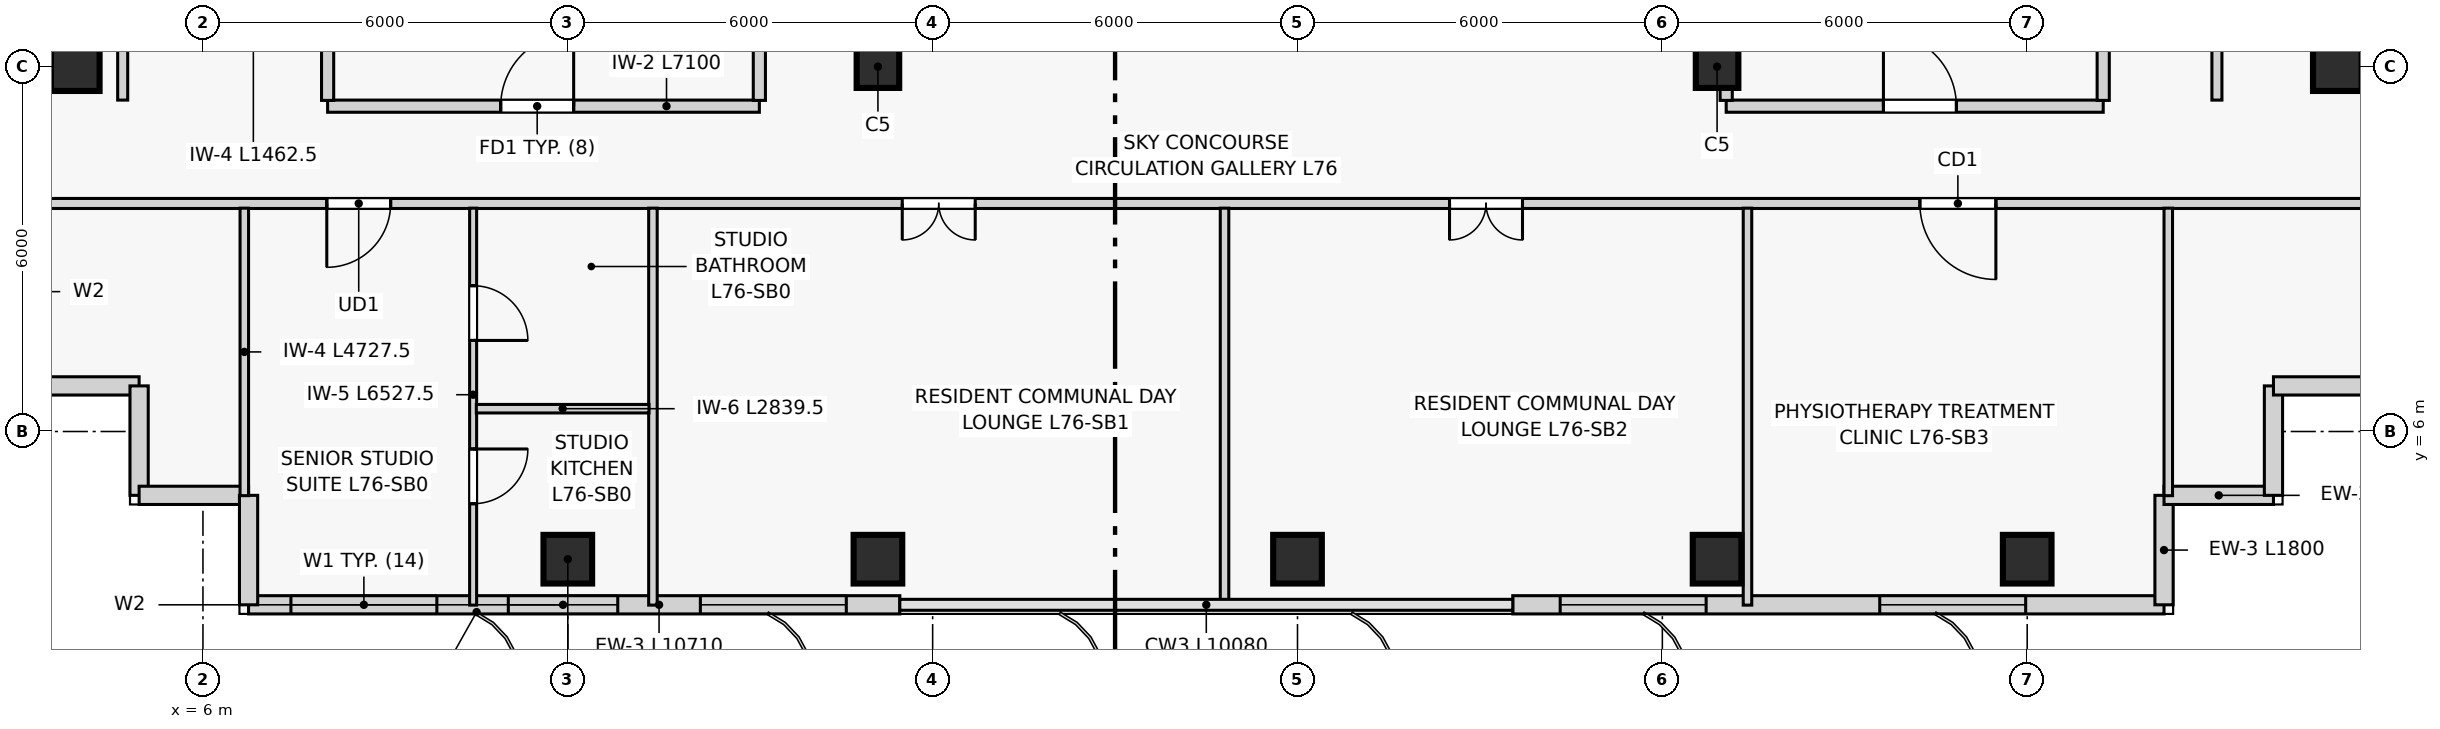
"""IFC4 building model, lengths in metres.
Left out: names, types, materials, properties, quantities, classifications, styles, units other than length and angle.
Written with IfcOpenShell. Run it as: python <this file> out.ifc"""

import sys

from ifc_helpers import new_model, si_unit, direction, frame, frame_2d, origin, origin_2d, place, context, subcontext, project, spatial, rectangle, extrude, source, transform, mapped, element, fill, save


model = new_model("IFC4")
c1 = context("Model", 3, precision=1e-05, world=origin(), true_north=direction((0.0, 1.0)))
c2 = subcontext(c1, "Body", "Model", "MODEL_VIEW")
j1 = project(units=[si_unit("LENGTHUNIT", "METRE"), si_unit("PLANEANGLEUNIT", "RADIAN")], contexts=[c1])
p1 = place(None, origin())
s1 = spatial("IfcSite", under=j1, at=p1, CompositionType="ELEMENT")
p2 = place(p1, origin())
s2 = spatial("IfcBuilding", under=s1, at=p2, CompositionType="ELEMENT")
p3 = place(p2, frame((0.0, 0.0, 289.5)))
s3 = spatial("IfcBuildingStorey", under=s2, at=p3, CompositionType="ELEMENT", Elevation=289.5)
m1 = source(origin(), c2, "Body", "SweptSolid", [
    extrude(rectangle(XDim=0.8, YDim=0.8, at=origin_2d()), origin(), (0.0, 0.0, 1.0), 4.2),
])
for number, where, z_axis, x_axis in (
    (1, (12.0, 3.9, 0.0), (0.0, 0.0, 1.0), (1.0, 0.0, 0.0)),
    (2, (17.1, 3.9, 0.0), (0.0, 0.0, 1.0), (1.0, 0.0, 0.0)),
    (3, (24.0, 3.9, 0.0), (0.0, 0.0, 1.0), (1.0, 0.0, 0.0)),
    (4, (30.9, 3.9, 0.0), (0.0, 0.0, 1.0), (1.0, 0.0, 0.0)),
    (5, (36.0, 3.9, 0.0), (0.0, 0.0, 1.0), (1.0, 0.0, 0.0)),
    (6, (3.9, 12.0, 0.0), (0.0, 0.0, 1.0), (1.0, 0.0, 0.0)),
    (7, (41.1, 12.0, 0.0), (0.0, 0.0, 1.0), (1.0, 0.0, 0.0)),
):
    element("IfcColumn", number, at=place(p3, frame(where, z_axis=z_axis, x_axis=x_axis)), inside=s3, PredefinedType="COLUMN", context=c2, shape_type="MappedRepresentation", body=[
        mapped(m1, transform((0.0, 0.0, 0.0), scale=1.0)),
    ])
m2 = source(origin(), c2, "Body", "SweptSolid", [
    extrude(rectangle(XDim=0.7, YDim=0.7, at=origin_2d()), origin(), (0.0, 0.0, 1.0), 4.2),
])
for number, where, z_axis, x_axis in (
    (8, (17.1, 12.0, 0.0), (0.0, 0.0, 1.0), (1.0, 0.0, 0.0)),
    (9, (30.9, 12.0, 0.0), (0.0, 0.0, 1.0), (1.0, 0.0, 0.0)),
):
    element("IfcColumn", number, at=place(p3, frame(where, z_axis=z_axis, x_axis=x_axis)), inside=s3, PredefinedType="COLUMN", context=c2, shape_type="MappedRepresentation", body=[
        mapped(m2, transform((0.0, 0.0, 0.0), scale=1.0)),
    ])
p4 = place(p3, frame((6.75, 3.15, 0.0), z_axis=(0.0, 0.0, 1.0), x_axis=(1.0, 0.0, 0.0)))
e10 = element("IfcWall", 10, at=p4, inside=s3, PredefinedType="SOLIDWALL", context=c2, shape_type="SweptSolid", body=[
    extrude(rectangle(XDim=10.71, YDim=0.3, at=frame_2d((5.355, 0.0))), origin(), (0.0, 0.0, 1.0), 3.92),
])
p5 = place(p4, frame((0.697, 0.0, 0.8)))
e11 = element("IfcOpeningElement", 11, at=p5, cuts=e10, PredefinedType="OPENING", context=c2, shape_type="SweptSolid", body=[
    extrude(rectangle(XDim=2.4, YDim=2.1, at=frame_2d((1.2, 1.05))), frame((0.0, 0.16, 0.0), z_axis=(0.0, -1.0, 0.0), x_axis=(1.0, 0.0, 0.0)), (0.0, 0.0, 1.0), 0.32),
])
p6 = place(p4, frame((4.271, 0.0, 0.8)))
e12 = element("IfcOpeningElement", 12, at=p6, cuts=e10, PredefinedType="OPENING", context=c2, shape_type="SweptSolid", body=[
    extrude(rectangle(XDim=1.8, YDim=2.1, at=frame_2d((0.9, 1.05))), frame((0.0, 0.16, 0.0), z_axis=(0.0, -1.0, 0.0), x_axis=(1.0, 0.0, 0.0)), (0.0, 0.0, 1.0), 0.32),
])
p7 = place(p4, frame((7.43, 0.0, 0.8)))
e13 = element("IfcOpeningElement", 13, at=p7, cuts=e10, PredefinedType="OPENING", context=c2, shape_type="SweptSolid", body=[
    extrude(rectangle(XDim=2.4, YDim=2.1, at=frame_2d((1.2, 1.05))), frame((0.0, 0.16, 0.0), z_axis=(0.0, -1.0, 0.0), x_axis=(1.0, 0.0, 0.0)), (0.0, 0.0, 1.0), 0.32),
])
p8 = place(p3, frame((27.54, 3.15, 0.0), z_axis=(0.0, 0.0, 1.0), x_axis=(1.0, 0.0, 0.0)))
e14 = element("IfcWall", 14, at=p8, inside=s3, PredefinedType="SOLIDWALL", context=c2, shape_type="SweptSolid", body=[
    extrude(rectangle(XDim=10.71, YDim=0.3, at=frame_2d((5.355, 0.0))), origin(), (0.0, 0.0, 1.0), 3.92),
])
p9 = place(p8, frame((0.78, 0.0, 0.8)))
e15 = element("IfcOpeningElement", 15, at=p9, cuts=e14, PredefinedType="OPENING", context=c2, shape_type="SweptSolid", body=[
    extrude(rectangle(XDim=2.4, YDim=2.1, at=frame_2d((1.2, 1.05))), frame((0.0, 0.16, 0.0), z_axis=(0.0, -1.0, 0.0), x_axis=(1.0, 0.0, 0.0)), (0.0, 0.0, 1.0), 0.32),
])
p10 = place(p8, frame((6.035, 0.0, 0.8)))
e16 = element("IfcOpeningElement", 16, at=p10, cuts=e14, PredefinedType="OPENING", context=c2, shape_type="SweptSolid", body=[
    extrude(rectangle(XDim=2.4, YDim=2.1, at=frame_2d((1.2, 1.05))), frame((0.0, 0.16, 0.0), z_axis=(0.0, -1.0, 0.0), x_axis=(1.0, 0.0, 0.0)), (0.0, 0.0, 1.0), 0.32),
])
for number, where, z_axis, x_axis in (
    (17, (38.25, 3.15, 0.0), (0.0, 0.0, 1.0), (0.0, 1.0, 0.0)),
    (18, (38.25, 4.95, 0.0), (0.0, 0.0, 1.0), (1.0, 0.0, 0.0)),
    (19, (40.05, 4.95, 0.0), (0.0, 0.0, 1.0), (0.0, 1.0, 0.0)),
    (20, (40.05, 6.75, 0.0), (0.0, 0.0, 1.0), (1.0, 0.0, 0.0)),
    (21, (3.15, 6.75, 0.0), (0.0, 0.0, 1.0), (1.0, 0.0, 0.0)),
    (22, (4.95, 6.75, 0.0), (0.0, 0.0, 1.0), (0.0, -1.0, 0.0)),
    (23, (4.95, 4.95, 0.0), (0.0, 0.0, 1.0), (1.0, 0.0, 0.0)),
    (24, (6.75, 4.95, 0.0), (0.0, 0.0, 1.0), (0.0, -1.0, 0.0)),
):
    element("IfcWall", number, at=place(p3, frame(where, z_axis=z_axis, x_axis=x_axis)), inside=s3, PredefinedType="SOLIDWALL", context=c2, shape_type="SweptSolid", body=[
        extrude(rectangle(XDim=1.8, YDim=0.3, at=frame_2d((0.9, 0.0))), origin(), (0.0, 0.0, 1.0), 3.92),
    ])
p11 = place(p3, frame((8.05, 11.35, 0.0), z_axis=(0.0, 0.0, 1.0), x_axis=(1.0, 0.0, 0.0)))
e25 = element("IfcWall", 25, at=p11, inside=s3, PredefinedType="PARTITIONING", context=c2, shape_type="SweptSolid", body=[
    extrude(rectangle(XDim=7.1, YDim=0.2, at=frame_2d((3.55, 0.0))), origin(), (0.0, 0.0, 1.0), 3.92),
])
p12 = place(p11, frame((2.846, 0.0, 0.0)))
e26 = element("IfcOpeningElement", 26, at=p12, cuts=e25, PredefinedType="OPENING", context=c2, shape_type="SweptSolid", body=[
    extrude(rectangle(XDim=1.2, YDim=2.2, at=frame_2d((0.6, 1.1))), frame((0.0, 0.11, 0.0), z_axis=(0.0, -1.0, 0.0), x_axis=(1.0, 0.0, 0.0)), (0.0, 0.0, 1.0), 0.22),
])
for number, where, z_axis, x_axis in (
    (27, (8.05, 11.445, 0.0), (0.0, 0.0, 1.0), (0.0, 1.0, 0.0)),
    (28, (15.15, 11.445, 0.0), (0.0, 0.0, 1.0), (0.0, 1.0, 0.0)),
):
    element("IfcWall", number, at=place(p3, frame(where, z_axis=z_axis, x_axis=x_axis)), inside=s3, PredefinedType="PARTITIONING", context=c2, shape_type="SweptSolid", body=[
        extrude(rectangle(XDim=3.335, YDim=0.2, at=frame_2d((1.667, 0.0))), origin(), (0.0, 0.0, 1.0), 3.92),
    ])
p13 = place(p3, frame((31.05, 11.35, 0.0), z_axis=(0.0, 0.0, 1.0), x_axis=(1.0, 0.0, 0.0)))
e29 = element("IfcWall", 29, at=p13, inside=s3, PredefinedType="PARTITIONING", context=c2, shape_type="SweptSolid", body=[
    extrude(rectangle(XDim=6.2, YDim=0.2, at=frame_2d((3.1, 0.0))), origin(), (0.0, 0.0, 1.0), 3.92),
])
p14 = place(p13, frame((2.586, 0.0, 0.0)))
e30 = element("IfcOpeningElement", 30, at=p14, cuts=e29, PredefinedType="OPENING", context=c2, shape_type="SweptSolid", body=[
    extrude(rectangle(XDim=1.2, YDim=2.2, at=frame_2d((0.6, 1.1))), frame((0.0, 0.11, 0.0), z_axis=(0.0, -1.0, 0.0), x_axis=(1.0, 0.0, 0.0)), (0.0, 0.0, 1.0), 0.22),
])
p15 = place(p3, frame((31.05, 11.445, 0.0), z_axis=(0.0, 0.0, 1.0), x_axis=(0.0, 1.0, 0.0)))
e31 = element("IfcWall", 31, at=p15, inside=s3, PredefinedType="PARTITIONING", context=c2, shape_type="SweptSolid", body=[
    extrude(rectangle(XDim=3.335, YDim=0.2, at=frame_2d((1.667, 0.0))), origin(), (0.0, 0.0, 1.0), 3.07),
])
p16 = place(p3, frame((37.25, 11.445, 0.0), z_axis=(0.0, 0.0, 1.0), x_axis=(0.0, 1.0, 0.0)))
e32 = element("IfcWall", 32, at=p16, inside=s3, PredefinedType="PARTITIONING", context=c2, shape_type="SweptSolid", body=[
    extrude(rectangle(XDim=3.335, YDim=0.2, at=frame_2d((1.667, 0.0))), origin(), (0.0, 0.0, 1.0), 3.92),
])
p17 = place(p3, frame((3.145, 9.75, 0.0), z_axis=(0.0, 0.0, 1.0), x_axis=(1.0, 0.0, 0.0)))
e33 = element("IfcWall", 33, at=p17, inside=s3, PredefinedType="PARTITIONING", context=c2, shape_type="SweptSolid", body=[
    extrude(rectangle(XDim=38.71, YDim=0.165, at=frame_2d((19.355, 0.0))), origin(), (0.0, 0.0, 1.0), 3.92),
])
p18 = place(p17, frame((4.892, 0.0, 0.0)))
e34 = element("IfcOpeningElement", 34, at=p18, cuts=e33, PredefinedType="OPENING", context=c2, shape_type="SweptSolid", body=[
    extrude(rectangle(XDim=1.05, YDim=2.15, at=frame_2d((0.525, 1.075))), frame((0.0, 0.093, 0.0), z_axis=(0.0, -1.0, 0.0), x_axis=(1.0, 0.0, 0.0)), (0.0, 0.0, 1.0), 0.185),
])
p19 = place(p17, frame((14.355, 0.0, 0.0)))
e35 = element("IfcOpeningElement", 35, at=p19, cuts=e33, PredefinedType="OPENING", context=c2, shape_type="SweptSolid", body=[
    extrude(rectangle(XDim=1.2, YDim=2.2, at=frame_2d((0.6, 1.1))), frame((0.0, 0.093, 0.0), z_axis=(0.0, -1.0, 0.0), x_axis=(1.0, 0.0, 0.0)), (0.0, 0.0, 1.0), 0.185),
])
p20 = place(p17, frame((23.355, 0.0, 0.0)))
e36 = element("IfcOpeningElement", 36, at=p20, cuts=e33, PredefinedType="OPENING", context=c2, shape_type="SweptSolid", body=[
    extrude(rectangle(XDim=1.2, YDim=2.2, at=frame_2d((0.6, 1.1))), frame((0.0, 0.093, 0.0), z_axis=(0.0, -1.0, 0.0), x_axis=(1.0, 0.0, 0.0)), (0.0, 0.0, 1.0), 0.185),
])
p21 = place(p17, frame((31.09, 0.0, 0.0)))
e37 = element("IfcOpeningElement", 37, at=p21, cuts=e33, PredefinedType="OPENING", context=c2, shape_type="SweptSolid", body=[
    extrude(rectangle(XDim=1.25, YDim=2.2, at=frame_2d((0.625, 1.1))), frame((0.0, 0.093, 0.0), z_axis=(0.0, -1.0, 0.0), x_axis=(1.0, 0.0, 0.0)), (0.0, 0.0, 1.0), 0.185),
])
p22 = place(p3, frame((4.68, 11.45, 0.0), z_axis=(0.0, 0.0, 1.0), x_axis=(0.0, 1.0, 0.0)))
e38 = element("IfcWall", 38, at=p22, inside=s3, PredefinedType="PARTITIONING", context=c2, shape_type="SweptSolid", body=[
    extrude(rectangle(XDim=3.7, YDim=0.165, at=frame_2d((1.85, 0.0))), origin(), (0.0, 0.0, 1.0), 3.92),
])
p23 = place(p22, frame((1.475, 0.0, 0.0)))
e39 = element("IfcOpeningElement", 39, at=p23, cuts=e38, PredefinedType="OPENING", context=c2, shape_type="SweptSolid", body=[
    extrude(rectangle(XDim=0.95, YDim=2.1, at=frame_2d((0.475, 1.05))), frame((0.0, 0.093, 0.0), z_axis=(0.0, -1.0, 0.0), x_axis=(1.0, 0.0, 0.0)), (0.0, 0.0, 1.0), 0.185),
])
p24 = place(p3, frame((39.12, 11.45, 0.0), z_axis=(0.0, 0.0, 1.0), x_axis=(0.0, 1.0, 0.0)))
e40 = element("IfcWall", 40, at=p24, inside=s3, PredefinedType="PARTITIONING", context=c2, shape_type="SweptSolid", body=[
    extrude(rectangle(XDim=18.9, YDim=0.165, at=frame_2d((9.45, 0.0))), origin(), (0.0, 0.0, 1.0), 3.92),
])
p25 = place(p24, frame((2.05, 0.0, 0.0)))
e41 = element("IfcOpeningElement", 41, at=p25, cuts=e40, PredefinedType="OPENING", context=c2, shape_type="SweptSolid", body=[
    extrude(rectangle(XDim=0.95, YDim=2.1, at=frame_2d((0.475, 1.05))), frame((0.0, 0.093, 0.0), z_axis=(0.0, -1.0, 0.0), x_axis=(1.0, 0.0, 0.0)), (0.0, 0.0, 1.0), 0.185),
])
p26 = place(p3, frame((6.68, 4.945, 0.0), z_axis=(0.0, 0.0, 1.0), x_axis=(0.0, 1.0, 0.0)))
e42 = element("IfcWall", 42, at=p26, inside=s3, PredefinedType="PARTITIONING", context=c2, shape_type="SweptSolid", body=[
    extrude(rectangle(XDim=4.728, YDim=0.14, at=frame_2d((2.364, 0.0))), origin(), (0.0, 0.0, 1.0), 3.92),
])
for number, where, z_axis, x_axis in (
    (43, (13.4, 3.145, 0.0), (0.0, 0.0, 1.0), (0.0, 1.0, 0.0)),
    (44, (22.8, 3.145, 0.0), (0.0, 0.0, 1.0), (0.0, 1.0, 0.0)),
    (45, (31.4, 3.145, 0.0), (0.0, 0.0, 1.0), (0.0, 1.0, 0.0)),
):
    element("IfcWall", number, at=place(p3, frame(where, z_axis=z_axis, x_axis=x_axis)), inside=s3, PredefinedType="PARTITIONING", context=c2, shape_type="SweptSolid", body=[
        extrude(rectangle(XDim=6.528, YDim=0.14, at=frame_2d((3.264, 0.0))), origin(), (0.0, 0.0, 1.0), 3.92),
    ])
p27 = place(p3, frame((38.32, 4.945, 0.0), z_axis=(0.0, 0.0, 1.0), x_axis=(0.0, 1.0, 0.0)))
e46 = element("IfcWall", 46, at=p27, inside=s3, PredefinedType="PARTITIONING", context=c2, shape_type="SweptSolid", body=[
    extrude(rectangle(XDim=4.728, YDim=0.14, at=frame_2d((2.364, 0.0))), origin(), (0.0, 0.0, 1.0), 3.92),
])
p28 = place(p3, frame((10.443, 3.145, 0.0), z_axis=(0.0, 0.0, 1.0), x_axis=(0.0, 1.0, 0.0)))
e47 = element("IfcWall", 47, at=p28, inside=s3, PredefinedType="PARTITIONING", context=c2, shape_type="SweptSolid", body=[
    extrude(rectangle(XDim=6.528, YDim=0.115, at=frame_2d((3.264, 0.0))), origin(), (0.0, 0.0, 1.0), 3.92),
])
p29 = place(p28, frame((1.667, 0.0, 0.0)))
e48 = element("IfcOpeningElement", 48, at=p29, cuts=e47, PredefinedType="OPENING", context=c2, shape_type="SweptSolid", body=[
    extrude(rectangle(XDim=0.9, YDim=2.1, at=frame_2d((0.45, 1.05))), frame((0.0, 0.067, 0.0), z_axis=(0.0, -1.0, 0.0), x_axis=(1.0, 0.0, 0.0)), (0.0, 0.0, 1.0), 0.135),
])
p30 = place(p28, frame((4.353, 0.0, 0.0)))
e49 = element("IfcOpeningElement", 49, at=p30, cuts=e47, PredefinedType="OPENING", context=c2, shape_type="SweptSolid", body=[
    extrude(rectangle(XDim=0.9, YDim=2.1, at=frame_2d((0.45, 1.05))), frame((0.0, 0.067, 0.0), z_axis=(0.0, -1.0, 0.0), x_axis=(1.0, 0.0, 0.0)), (0.0, 0.0, 1.0), 0.135),
])
p31 = place(p3, frame((10.496, 6.375, 0.0), z_axis=(0.0, 0.0, 1.0), x_axis=(1.0, 0.0, 0.0)))
e50 = element("IfcWall", 50, at=p31, inside=s3, PredefinedType="PLUMBINGWALL", context=c2, shape_type="SweptSolid", body=[
    extrude(rectangle(XDim=2.839, YDim=0.14, at=frame_2d((1.42, 0.0))), origin(), (0.0, 0.0, 1.0), 3.92),
])
m3 = source(origin(), c2, "Body", "SweptSolid", [
    extrude(rectangle(XDim=2.4, YDim=2.1, at=frame_2d((1.2, 1.05))), frame((0.0, 0.03, 0.0), z_axis=(0.0, -1.0, 0.0), x_axis=(1.0, 0.0, 0.0)), (0.0, 0.0, 1.0), 0.06),
])
p32 = place(p5, origin())
e51 = element("IfcWindow", 51, at=p32, inside=s3, PartitioningType="SINGLE_PANEL", PredefinedType="WINDOW", context=c2, shape_type="MappedRepresentation", body=[
    mapped(m3, transform((0.0, 0.0, 0.0), scale=1.0)),
])
fill(e11, e51)
m4 = source(origin(), c2, "Body", "SweptSolid", [
    extrude(rectangle(XDim=1.8, YDim=2.1, at=frame_2d((0.9, 1.05))), frame((0.0, 0.03, 0.0), z_axis=(0.0, -1.0, 0.0), x_axis=(1.0, 0.0, 0.0)), (0.0, 0.0, 1.0), 0.06),
])
p33 = place(p6, origin())
e52 = element("IfcWindow", 52, at=p33, inside=s3, PartitioningType="SINGLE_PANEL", PredefinedType="WINDOW", context=c2, shape_type="MappedRepresentation", body=[
    mapped(m4, transform((0.0, 0.0, 0.0), scale=1.0)),
])
fill(e12, e52)
p34 = place(p7, origin())
e53 = element("IfcWindow", 53, at=p34, inside=s3, PartitioningType="SINGLE_PANEL", PredefinedType="WINDOW", context=c2, shape_type="MappedRepresentation", body=[
    mapped(m3, transform((0.0, 0.0, 0.0), scale=1.0)),
])
fill(e13, e53)
p35 = place(p9, origin())
e54 = element("IfcWindow", 54, at=p35, inside=s3, PartitioningType="SINGLE_PANEL", PredefinedType="WINDOW", context=c2, shape_type="MappedRepresentation", body=[
    mapped(m3, transform((0.0, 0.0, 0.0), scale=1.0)),
])
fill(e15, e54)
p36 = place(p10, origin())
e55 = element("IfcWindow", 55, at=p36, inside=s3, PartitioningType="SINGLE_PANEL", PredefinedType="WINDOW", context=c2, shape_type="MappedRepresentation", body=[
    mapped(m3, transform((0.0, 0.0, 0.0), scale=1.0)),
])
fill(e16, e55)
m5 = source(origin(), c2, "Body", "SweptSolid", [
    extrude(rectangle(XDim=1.2, YDim=2.2, at=frame_2d((0.6, 1.1))), frame((0.0, 0.025, 0.0), z_axis=(0.0, -1.0, 0.0), x_axis=(1.0, 0.0, 0.0)), (0.0, 0.0, 1.0), 0.05),
])
p37 = place(p12, origin())
e56 = element("IfcDoor", 56, at=p37, inside=s3, OperationType="SINGLE_SWING_RIGHT", PredefinedType="DOOR", context=c2, shape_type="MappedRepresentation", body=[
    mapped(m5, transform((0.0, 0.0, 0.0), scale=1.0)),
])
fill(e26, e56)
p38 = place(p14, origin())
e57 = element("IfcDoor", 57, at=p38, inside=s3, OperationType="SINGLE_SWING_LEFT", PredefinedType="DOOR", context=c2, shape_type="MappedRepresentation", body=[
    mapped(m5, transform((0.0, 0.0, 0.0), scale=1.0)),
])
fill(e30, e57)
m6 = source(origin(), c2, "Body", "SweptSolid", [
    extrude(rectangle(XDim=1.05, YDim=2.15, at=frame_2d((0.525, 1.075))), frame((0.0, 0.025, 0.0), z_axis=(0.0, -1.0, 0.0), x_axis=(1.0, 0.0, 0.0)), (0.0, 0.0, 1.0), 0.05),
])
p39 = place(p18, frame((1.05, 0.0, 0.0), z_axis=(0.0, 0.0, 1.0), x_axis=(-1.0, 0.0, 0.0)))
e58 = element("IfcDoor", 58, at=p39, inside=s3, OperationType="SINGLE_SWING_RIGHT", PredefinedType="DOOR", context=c2, shape_type="MappedRepresentation", body=[
    mapped(m6, transform((0.0, 0.0, 0.0), scale=1.0)),
])
fill(e34, e58)
m7 = source(origin(), c2, "Body", "SweptSolid", [
    extrude(rectangle(XDim=0.9, YDim=2.1, at=frame_2d((0.45, 1.05))), frame((0.0, 0.025, 0.0), z_axis=(0.0, -1.0, 0.0), x_axis=(1.0, 0.0, 0.0)), (0.0, 0.0, 1.0), 0.05),
])
p40 = place(p29, frame((0.9, 0.0, 0.0), z_axis=(0.0, 0.0, 1.0), x_axis=(-1.0, 0.0, 0.0)))
e59 = element("IfcDoor", 59, at=p40, inside=s3, OperationType="SINGLE_SWING_LEFT", PredefinedType="DOOR", context=c2, shape_type="MappedRepresentation", body=[
    mapped(m7, transform((0.0, 0.0, 0.0), scale=1.0)),
])
fill(e48, e59)
p41 = place(p30, frame((0.9, 0.0, 0.0), z_axis=(0.0, 0.0, 1.0), x_axis=(-1.0, 0.0, 0.0)))
e60 = element("IfcDoor", 60, at=p41, inside=s3, OperationType="SINGLE_SWING_RIGHT", PredefinedType="DOOR", context=c2, shape_type="MappedRepresentation", body=[
    mapped(m7, transform((0.0, 0.0, 0.0), scale=1.0)),
])
fill(e49, e60)
p42 = place(p19, frame((1.2, 0.0, 0.0), z_axis=(0.0, 0.0, 1.0), x_axis=(-1.0, 0.0, 0.0)))
e61 = element("IfcDoor", 61, at=p42, inside=s3, OperationType="DOUBLE_DOOR_SINGLE_SWING", PredefinedType="DOOR", context=c2, shape_type="MappedRepresentation", body=[
    mapped(m5, transform((0.0, 0.0, 0.0), scale=1.0)),
])
fill(e35, e61)
p43 = place(p20, frame((1.2, 0.0, 0.0), z_axis=(0.0, 0.0, 1.0), x_axis=(-1.0, 0.0, 0.0)))
e62 = element("IfcDoor", 62, at=p43, inside=s3, OperationType="DOUBLE_DOOR_SINGLE_SWING", PredefinedType="DOOR", context=c2, shape_type="MappedRepresentation", body=[
    mapped(m5, transform((0.0, 0.0, 0.0), scale=1.0)),
])
fill(e36, e62)
m8 = source(origin(), c2, "Body", "SweptSolid", [
    extrude(rectangle(XDim=1.25, YDim=2.2, at=frame_2d((0.625, 1.1))), frame((0.0, 0.025, 0.0), z_axis=(0.0, -1.0, 0.0), x_axis=(1.0, 0.0, 0.0)), (0.0, 0.0, 1.0), 0.05),
])
p44 = place(p21, frame((1.25, 0.0, 0.0), z_axis=(0.0, 0.0, 1.0), x_axis=(-1.0, 0.0, 0.0)))
e63 = element("IfcDoor", 63, at=p44, inside=s3, OperationType="SINGLE_SWING_LEFT", PredefinedType="DOOR", context=c2, shape_type="MappedRepresentation", body=[
    mapped(m8, transform((0.0, 0.0, 0.0), scale=1.0)),
])
fill(e37, e63)
save(model, sys.argv[1])
